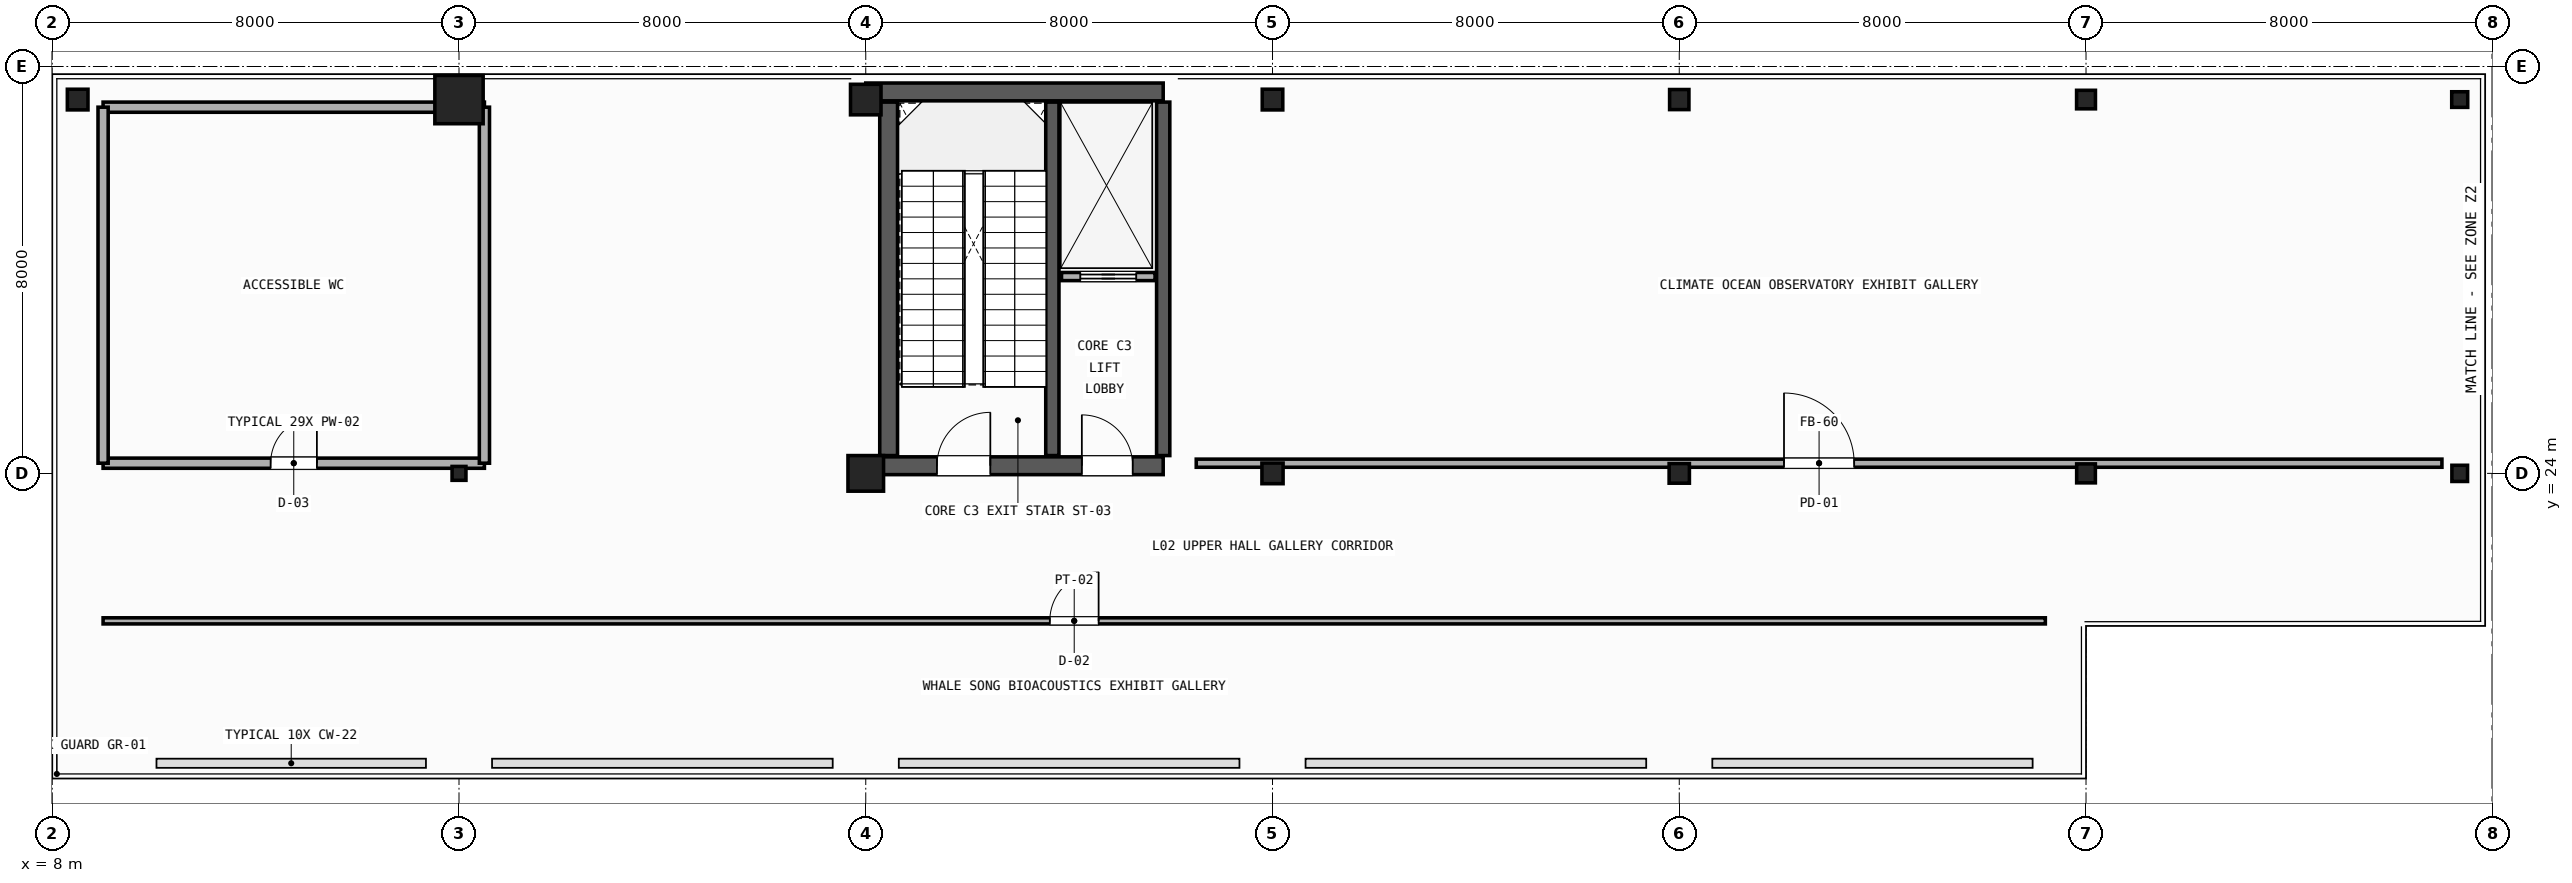
"""IFC4 building model, lengths in metres.
Left out: names, types, materials, properties, quantities, classifications, styles, units other than length and angle.
Written with IfcOpenShell. Run it as: python <this file> out.ifc"""

import sys

from ifc_helpers import new_model, si_unit, direction, frame, frame_2d, origin, origin_2d, place, context, subcontext, project, spatial, rectangle, hollow_circle, i_section, extrude, element, fill, save


model = new_model("IFC4")
c1 = context("Model", 3, precision=1e-05, world=origin(), true_north=direction((0.0, 1.0)))
c2 = subcontext(c1, "Body", "Model", "MODEL_VIEW")
j1 = project(units=[si_unit("LENGTHUNIT", "METRE"), si_unit("PLANEANGLEUNIT", "RADIAN")], contexts=[c1])
p1 = place(None, origin())
s1 = spatial("IfcSite", under=j1, at=p1, CompositionType="ELEMENT")
p2 = place(p1, origin())
s2 = spatial("IfcBuilding", under=s1, at=p2, CompositionType="ELEMENT")
p3 = place(p2, frame((0.0, 0.0, 10.2)))
s3 = spatial("IfcBuildingStorey", under=s2, at=p3, CompositionType="ELEMENT", Elevation=10.2)
p4 = place(p3, frame((8.5, 31.35, 0.0), z_axis=(0.0, 0.0, 1.0), x_axis=(0.0, 1.0, 0.0)))
e1 = element("IfcColumn", 1, at=p4, inside=s3, PredefinedType="COLUMN", context=c2, shape_type="SweptSolid", body=[
    extrude(hollow_circle(Radius=0.203, WallThickness=0.012, at=origin_2d()), origin(), (0.0, 0.0, 1.0), 4.8),
])
p5 = place(p3, frame((16.0, 24.0, 0.0), z_axis=(0.0, 0.0, 1.0), x_axis=(0.0, 1.0, 0.0)))
e2 = element("IfcColumn", 2, at=p5, inside=s3, PredefinedType="COLUMN", context=c2, shape_type="SweptSolid", body=[
    extrude(hollow_circle(Radius=0.136, WallThickness=0.012, at=origin_2d()), origin(), (0.0, 0.0, 1.0), 4.8),
])
p6 = place(p3, frame((16.0, 31.35, 0.0), z_axis=(0.0, 0.0, 1.0), x_axis=(1.0, 0.0, 0.0)))
e3 = element("IfcColumn", 3, at=p6, inside=s3, PredefinedType="COLUMN", context=c2, shape_type="SweptSolid", body=[
    extrude(rectangle(XDim=0.95, YDim=0.95, at=origin_2d()), origin(), (0.0, 0.0, 1.0), 4.58),
])
p7 = place(p3, frame((24.0, 24.0, 0.0), z_axis=(0.0, 0.0, 1.0), x_axis=(1.0, 0.0, 0.0)))
e4 = element("IfcColumn", 4, at=p7, inside=s3, PredefinedType="COLUMN", context=c2, shape_type="SweptSolid", body=[
    extrude(rectangle(XDim=0.7, YDim=0.7, at=origin_2d()), origin(), (0.0, 0.0, 1.0), 4.58),
])
p8 = place(p3, frame((24.0, 31.35, 0.0), z_axis=(0.0, 0.0, 1.0), x_axis=(0.0, 1.0, 0.0)))
e5 = element("IfcColumn", 5, at=p8, inside=s3, PredefinedType="COLUMN", context=c2, shape_type="SweptSolid", body=[
    extrude(rectangle(XDim=0.6, YDim=0.6, at=origin_2d()), origin(), (0.0, 0.0, 1.0), 4.58),
])
p9 = place(p3, frame((32.0, 24.0, 0.0), z_axis=(0.0, 0.0, 1.0), x_axis=(0.0, 1.0, 0.0)))
e6 = element("IfcColumn", 6, at=p9, inside=s3, PredefinedType="COLUMN", context=c2, shape_type="SweptSolid", body=[
    extrude(i_section(OverallWidth=0.406, OverallDepth=0.416, WebThickness=0.03, FlangeThickness=0.048, FilletRadius=0.015, at=origin_2d()), origin(), (0.0, 0.0, 1.0), 4.58),
])
p10 = place(p3, frame((32.0, 31.35, 0.0), z_axis=(0.0, 0.0, 1.0), x_axis=(1.0, 0.0, 0.0)))
e7 = element("IfcColumn", 7, at=p10, inside=s3, PredefinedType="COLUMN", context=c2, shape_type="SweptSolid", body=[
    extrude(i_section(OverallWidth=0.404, OverallDepth=0.407, WebThickness=0.027, FlangeThickness=0.044, FilletRadius=0.015, at=origin_2d()), origin(), (0.0, 0.0, 1.0), 4.58),
])
p11 = place(p3, frame((40.0, 24.0, 0.0), z_axis=(0.0, 0.0, 1.0), x_axis=(1.0, 0.0, 0.0)))
e8 = element("IfcColumn", 8, at=p11, inside=s3, PredefinedType="COLUMN", context=c2, shape_type="SweptSolid", body=[
    extrude(i_section(OverallWidth=0.399, OverallDepth=0.386, WebThickness=0.021, FlangeThickness=0.033, FilletRadius=0.015, at=origin_2d()), origin(), (0.0, 0.0, 1.0), 4.58),
])
p12 = place(p3, frame((40.0, 31.35, 0.0), z_axis=(0.0, 0.0, 1.0), x_axis=(0.0, 1.0, 0.0)))
e9 = element("IfcColumn", 9, at=p12, inside=s3, PredefinedType="COLUMN", context=c2, shape_type="SweptSolid", body=[
    extrude(i_section(OverallWidth=0.395, OverallDepth=0.38, WebThickness=0.019, FlangeThickness=0.03, FilletRadius=0.015, at=origin_2d()), origin(), (0.0, 0.0, 1.0), 4.58),
])
p13 = place(p3, frame((48.0, 24.0, 0.0), z_axis=(0.0, 0.0, 1.0), x_axis=(0.0, 1.0, 0.0)))
e10 = element("IfcColumn", 10, at=p13, inside=s3, PredefinedType="COLUMN", context=c2, shape_type="SweptSolid", body=[
    extrude(i_section(OverallWidth=0.373, OverallDepth=0.368, WebThickness=0.015, FlangeThickness=0.024, FilletRadius=0.015, at=origin_2d()), origin(), (0.0, 0.0, 1.0), 4.58),
])
p14 = place(p3, frame((48.0, 31.35, 0.0), z_axis=(0.0, 0.0, 1.0), x_axis=(1.0, 0.0, 0.0)))
e11 = element("IfcColumn", 11, at=p14, inside=s3, PredefinedType="COLUMN", context=c2, shape_type="SweptSolid", body=[
    extrude(i_section(OverallWidth=0.371, OverallDepth=0.364, WebThickness=0.013, FlangeThickness=0.022, FilletRadius=0.015, at=origin_2d()), origin(), (0.0, 0.0, 1.0), 4.58),
])
p15 = place(p3, frame((55.35, 24.0, 0.0), z_axis=(0.0, 0.0, 1.0), x_axis=(1.0, 0.0, 0.0)))
e12 = element("IfcColumn", 12, at=p15, inside=s3, PredefinedType="COLUMN", context=c2, shape_type="SweptSolid", body=[
    extrude(i_section(OverallWidth=0.308, OverallDepth=0.318, WebThickness=0.013, FlangeThickness=0.021, FilletRadius=0.013, at=origin_2d()), origin(), (0.0, 0.0, 1.0), 4.8),
])
p16 = place(p3, frame((55.35, 31.35, 0.0), z_axis=(0.0, 0.0, 1.0), x_axis=(0.0, 1.0, 0.0)))
e13 = element("IfcColumn", 13, at=p16, inside=s3, PredefinedType="COLUMN", context=c2, shape_type="SweptSolid", body=[
    extrude(i_section(OverallWidth=0.307, OverallDepth=0.315, WebThickness=0.012, FlangeThickness=0.019, FilletRadius=0.013, at=origin_2d()), origin(), (0.0, 0.0, 1.0), 4.8),
])
p17 = place(p3, frame((24.0, 24.15, 0.0), z_axis=(0.0, 0.0, 1.0), x_axis=(1.0, 0.0, 0.0)))
e14 = element("IfcWall", 14, at=p17, inside=s3, PredefinedType="SHEAR", context=c2, shape_type="SweptSolid", body=[
    extrude(rectangle(XDim=5.85, YDim=0.35, at=frame_2d((2.925, 0.0))), origin(), (0.0, 0.0, 1.0), 4.57),
])
p18 = place(p17, frame((1.4, 0.0, 0.0)))
e15 = element("IfcOpeningElement", 15, at=p18, cuts=e14, PredefinedType="OPENING", context=c2, shape_type="SweptSolid", body=[
    extrude(rectangle(XDim=1.05, YDim=2.1, at=frame_2d((0.525, 1.05))), frame((0.0, 0.185, 0.0), z_axis=(0.0, -1.0, 0.0), x_axis=(1.0, 0.0, 0.0)), (0.0, 0.0, 1.0), 0.37),
])
p19 = place(p17, frame((4.25, 0.0, 0.0)))
e16 = element("IfcOpeningElement", 16, at=p19, cuts=e14, PredefinedType="OPENING", context=c2, shape_type="SweptSolid", body=[
    extrude(rectangle(XDim=1.0, YDim=2.15, at=frame_2d((0.5, 1.075))), frame((0.0, 0.185, 0.0), z_axis=(0.0, -1.0, 0.0), x_axis=(1.0, 0.0, 0.0)), (0.0, 0.0, 1.0), 0.37),
])
p20 = place(p3, frame((24.0, 31.5, 0.0), z_axis=(0.0, 0.0, 1.0), x_axis=(1.0, 0.0, 0.0)))
e17 = element("IfcWall", 17, at=p20, inside=s3, PredefinedType="SHEAR", context=c2, shape_type="SweptSolid", body=[
    extrude(rectangle(XDim=5.85, YDim=0.35, at=frame_2d((2.925, 0.0))), origin(), (0.0, 0.0, 1.0), 4.57),
])
p21 = place(p3, frame((24.45, 24.35, 0.0), z_axis=(0.0, 0.0, 1.0), x_axis=(0.0, 1.0, 0.0)))
e18 = element("IfcWall", 18, at=p21, inside=s3, PredefinedType="SHEAR", context=c2, shape_type="SweptSolid", body=[
    extrude(rectangle(XDim=6.95, YDim=0.35, at=frame_2d((3.475, 0.0))), origin(), (0.0, 0.0, 1.0), 4.57),
])
for number, where, z_axis, x_axis in (
    (19, (29.85, 24.35, 0.0), (0.0, 0.0, 1.0), (0.0, 1.0, 0.0)),
    (20, (27.67, 24.35, 0.0), (0.0, 0.0, 1.0), (0.0, 1.0, 0.0)),
):
    element("IfcWall", number, at=place(p3, frame(where, z_axis=z_axis, x_axis=x_axis)), inside=s3, PredefinedType="SHEAR", context=c2, shape_type="SweptSolid", body=[
        extrude(rectangle(XDim=6.95, YDim=0.26, at=frame_2d((3.475, 0.0))), origin(), (0.0, 0.0, 1.0), 4.57),
    ])
p22 = place(p3, frame((27.85, 27.87, 0.0), z_axis=(0.0, 0.0, 1.0), x_axis=(1.0, 0.0, 0.0)))
e21 = element("IfcWall", 21, at=p22, inside=s3, PredefinedType="PARTITIONING", context=c2, shape_type="SweptSolid", body=[
    extrude(rectangle(XDim=1.84, YDim=0.16, at=frame_2d((0.92, 0.0))), origin(), (0.0, 0.0, 1.0), 3.6),
])
p23 = place(p22, frame((0.37, 0.0, 0.0)))
e22 = element("IfcOpeningElement", 22, at=p23, cuts=e21, PredefinedType="OPENING", context=c2, shape_type="SweptSolid", body=[
    extrude(rectangle(XDim=1.1, YDim=2.15, at=frame_2d((0.55, 1.075))), frame((0.0, 0.09, 0.0), z_axis=(0.0, -1.0, 0.0), x_axis=(1.0, 0.0, 0.0)), (0.0, 0.0, 1.0), 0.18),
])
p24 = place(p3, frame((9.0, 21.1, 0.0), z_axis=(0.0, 0.0, 1.0), x_axis=(1.0, 0.0, 0.0)))
e23 = element("IfcWall", 23, at=p24, inside=s3, PredefinedType="PARTITIONING", context=c2, shape_type="SweptSolid", body=[
    extrude(rectangle(XDim=38.2, YDim=0.12, at=frame_2d((19.1, 0.0))), origin(), (0.0, 0.0, 1.0), 4.29),
])
p25 = place(p24, frame((18.62, 0.0, 0.0)))
e24 = element("IfcOpeningElement", 24, at=p25, cuts=e23, PredefinedType="OPENING", context=c2, shape_type="SweptSolid", body=[
    extrude(rectangle(XDim=0.96, YDim=2.1, at=frame_2d((0.48, 1.05))), frame((0.0, 0.07, 0.0), z_axis=(0.0, -1.0, 0.0), x_axis=(1.0, 0.0, 0.0)), (0.0, 0.0, 1.0), 0.14),
])
p26 = place(p3, frame((30.5, 24.2, 0.0), z_axis=(0.0, 0.0, 1.0), x_axis=(1.0, 0.0, 0.0)))
e25 = element("IfcWall", 25, at=p26, inside=s3, PredefinedType="PARTITIONING", context=c2, shape_type="SweptSolid", body=[
    extrude(rectangle(XDim=24.5, YDim=0.16, at=frame_2d((12.25, 0.0))), origin(), (0.0, 0.0, 1.0), 3.778),
])
p27 = place(p26, frame((11.56, 0.0, 0.0)))
e26 = element("IfcOpeningElement", 26, at=p27, cuts=e25, PredefinedType="OPENING", context=c2, shape_type="SweptSolid", body=[
    extrude(rectangle(XDim=1.38, YDim=2.25, at=frame_2d((0.69, 1.125))), frame((0.0, 0.09, 0.0), z_axis=(0.0, -1.0, 0.0), x_axis=(1.0, 0.0, 0.0)), (0.0, 0.0, 1.0), 0.18),
])
p28 = place(p3, frame((9.0, 24.2, 0.0), z_axis=(0.0, 0.0, 1.0), x_axis=(1.0, 0.0, 0.0)))
e27 = element("IfcWall", 27, at=p28, inside=s3, PredefinedType="PLUMBINGWALL", context=c2, shape_type="SweptSolid", body=[
    extrude(rectangle(XDim=7.5, YDim=0.2, at=frame_2d((3.75, 0.0))), origin(), (0.0, 0.0, 1.0), 4.007),
])
p29 = place(p28, frame((3.295, 0.0, 0.0)))
e28 = element("IfcOpeningElement", 28, at=p29, cuts=e27, PredefinedType="OPENING", context=c2, shape_type="SweptSolid", body=[
    extrude(rectangle(XDim=0.91, YDim=2.1, at=frame_2d((0.455, 1.05))), frame((0.0, 0.11, 0.0), z_axis=(0.0, -1.0, 0.0), x_axis=(1.0, 0.0, 0.0)), (0.0, 0.0, 1.0), 0.22),
])
p30 = place(p3, frame((9.0, 31.2, 0.0), z_axis=(0.0, 0.0, 1.0), x_axis=(1.0, 0.0, 0.0)))
e29 = element("IfcWall", 29, at=p30, inside=s3, PredefinedType="PLUMBINGWALL", context=c2, shape_type="SweptSolid", body=[
    extrude(rectangle(XDim=7.5, YDim=0.2, at=frame_2d((3.75, 0.0))), origin(), (0.0, 0.0, 1.0), 4.012),
])
for number, where, z_axis, x_axis in (
    (30, (9.0, 24.2, 0.0), (0.0, 0.0, 1.0), (0.0, 1.0, 0.0)),
    (31, (16.5, 24.2, 0.0), (0.0, 0.0, 1.0), (0.0, 1.0, 0.0)),
):
    element("IfcWall", number, at=place(p3, frame(where, z_axis=z_axis, x_axis=x_axis)), inside=s3, PredefinedType="PLUMBINGWALL", context=c2, shape_type="SweptSolid", body=[
        extrude(rectangle(XDim=7.0, YDim=0.2, at=frame_2d((3.5, 0.0))), origin(), (0.0, 0.0, 1.0), 4.29),
    ])
p31 = place(p23, origin())
e32 = element("IfcDoor", 32, at=p31, inside=s3, OperationType="SLIDING_TO_LEFT", PredefinedType="DOOR", context=c2, shape_type="SweptSolid", body=[
    extrude(rectangle(XDim=1.1, YDim=2.15, at=frame_2d((0.55, 1.075))), frame((0.0, 0.025, 0.0), z_axis=(0.0, -1.0, 0.0), x_axis=(1.0, 0.0, 0.0)), (0.0, 0.0, 1.0), 0.05),
])
fill(e22, e32)
p32 = place(p18, origin())
e33 = element("IfcDoor", 33, at=p32, inside=s3, OperationType="SINGLE_SWING_RIGHT", PredefinedType="DOOR", context=c2, shape_type="SweptSolid", body=[
    extrude(rectangle(XDim=1.05, YDim=2.1, at=frame_2d((0.525, 1.05))), frame((0.0, 0.025, 0.0), z_axis=(0.0, -1.0, 0.0), x_axis=(1.0, 0.0, 0.0)), (0.0, 0.0, 1.0), 0.05),
])
fill(e15, e33)
p33 = place(p19, origin())
e34 = element("IfcDoor", 34, at=p33, inside=s3, OperationType="SINGLE_SWING_LEFT", PredefinedType="DOOR", context=c2, shape_type="SweptSolid", body=[
    extrude(rectangle(XDim=1.0, YDim=2.15, at=frame_2d((0.5, 1.075))), frame((0.0, 0.025, 0.0), z_axis=(0.0, -1.0, 0.0), x_axis=(1.0, 0.0, 0.0)), (0.0, 0.0, 1.0), 0.05),
])
fill(e16, e34)
p34 = place(p25, origin())
e35 = element("IfcDoor", 35, at=p34, inside=s3, OperationType="SINGLE_SWING_RIGHT", PredefinedType="DOOR", context=c2, shape_type="SweptSolid", body=[
    extrude(rectangle(XDim=0.96, YDim=2.1, at=frame_2d((0.48, 1.05))), frame((0.0, 0.025, 0.0), z_axis=(0.0, -1.0, 0.0), x_axis=(1.0, 0.0, 0.0)), (0.0, 0.0, 1.0), 0.05),
])
fill(e24, e35)
p35 = place(p27, origin())
e36 = element("IfcDoor", 36, at=p35, inside=s3, OperationType="SINGLE_SWING_LEFT", PredefinedType="DOOR", context=c2, shape_type="SweptSolid", body=[
    extrude(rectangle(XDim=1.38, YDim=2.25, at=frame_2d((0.69, 1.125))), frame((0.0, 0.025, 0.0), z_axis=(0.0, -1.0, 0.0), x_axis=(1.0, 0.0, 0.0)), (0.0, 0.0, 1.0), 0.05),
])
fill(e26, e36)
p36 = place(p29, origin())
e37 = element("IfcDoor", 37, at=p36, inside=s3, OperationType="SINGLE_SWING_RIGHT", PredefinedType="DOOR", context=c2, shape_type="SweptSolid", body=[
    extrude(rectangle(XDim=0.91, YDim=2.1, at=frame_2d((0.455, 1.05))), frame((0.0, 0.025, 0.0), z_axis=(0.0, -1.0, 0.0), x_axis=(1.0, 0.0, 0.0)), (0.0, 0.0, 1.0), 0.05),
])
fill(e28, e37)
save(model, sys.argv[1])
